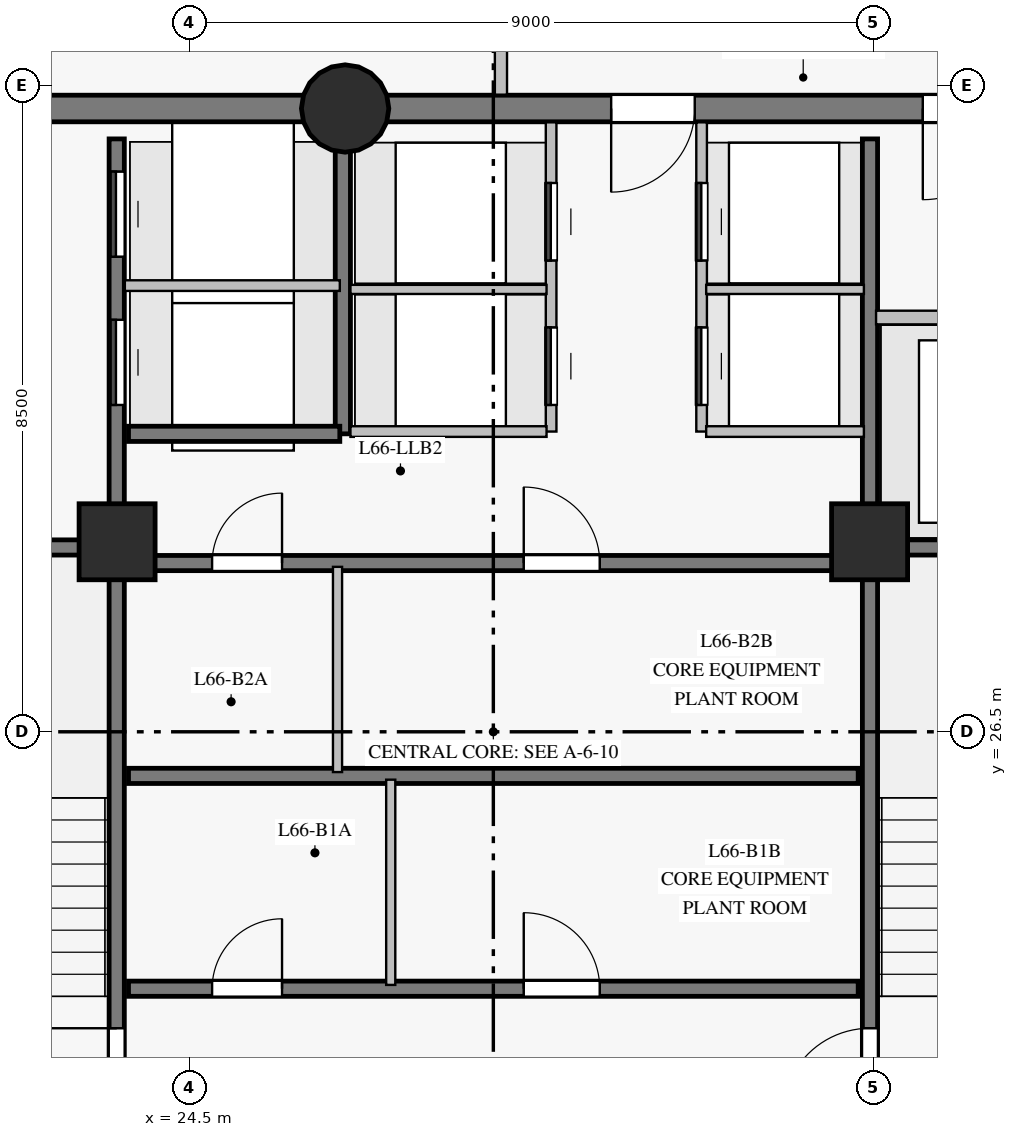
"""IFC4 building model, lengths in metres.
Left out: names, types, materials, properties, quantities, classifications, styles, units other than length and angle.
Written with IfcOpenShell. Run it as: python <this file> out.ifc"""

import sys

from ifc_helpers import new_model, si_unit, direction, frame, frame_2d, origin, origin_with_axes, origin_2d, place, context, subcontext, project, spatial, rectangle, circle, extrude, source, transform, mapped, element, fill, save


model = new_model("IFC4")
c1 = context("Model", 3, precision=1e-05, world=origin(), true_north=direction((0.0, 1.0)))
c2 = subcontext(c1, "Body", "Model", "MODEL_VIEW")
j1 = project(units=[si_unit("LENGTHUNIT", "METRE"), si_unit("PLANEANGLEUNIT", "RADIAN")], contexts=[c1])
p1 = place(None, origin())
s1 = spatial("IfcSite", under=j1, at=p1, CompositionType="ELEMENT")
p2 = place(p1, origin())
s2 = spatial("IfcBuilding", under=s1, at=p2, CompositionType="ELEMENT")
p3 = place(p2, frame((0.0, 0.0, 226.05)))
s3 = spatial("IfcBuildingStorey", under=s2, at=p3, CompositionType="ELEMENT", Elevation=226.05)
p4 = place(p3, frame((37.5, 34.7, 0.0), z_axis=(0.0, 0.0, 1.0), x_axis=(-1.0, 0.0, 0.0)))
e1 = element("IfcWall", 1, at=p4, inside=s3, PredefinedType="SHEAR", context=c2, shape_type="SweptSolid", body=[
    extrude(rectangle(XDim=10.95, YDim=0.35, at=frame_2d((5.475, 0.0))), origin(), (0.0, 0.0, 1.0), 2.85),
])
p5 = place(p4, frame((2.15, 0.0, 0.0)))
e2 = element("IfcOpeningElement", 2, at=p5, cuts=e1, PredefinedType="OPENING", context=c2, shape_type="SweptSolid", body=[
    extrude(rectangle(XDim=1.2, YDim=2.15, at=frame_2d((0.6, 1.075))), frame((0.0, 0.185, 0.0), z_axis=(0.0, -1.0, 0.0), x_axis=(1.0, 0.0, 0.0)), (0.0, 0.0, 1.0), 0.37),
])
p6 = place(p4, frame((6.35, 0.0, 0.0)))
e3 = element("IfcOpeningElement", 3, at=p6, cuts=e1, PredefinedType="OPENING", context=c2, shape_type="SweptSolid", body=[
    extrude(rectangle(XDim=1.1, YDim=2.15, at=frame_2d((0.55, 1.075))), frame((0.0, 0.185, 0.0), z_axis=(0.0, -1.0, 0.0), x_axis=(1.0, 0.0, 0.0)), (0.0, 0.0, 1.0), 0.37),
])
p7 = place(p3, frame((26.55, 34.7, 0.0), z_axis=(0.0, 0.0, 1.0), x_axis=(-1.0, 0.0, 0.0)))
e4 = element("IfcWall", 4, at=p7, inside=s3, PredefinedType="SHEAR", context=c2, shape_type="SweptSolid", body=[
    extrude(rectangle(XDim=7.05, YDim=0.35, at=frame_2d((3.525, 0.0))), origin(), (0.0, 0.0, 1.0), 2.85),
])
m1 = source(origin_with_axes(), c2, "Body", "SweptSolid", [
    extrude(circle(Radius=0.575, at=origin_2d()), origin(), (0.0, 0.0, 1.0), 3.05),
])
p8 = place(p3, frame((26.55, 34.7, 0.0), z_axis=(0.0, 0.0, 1.0), x_axis=(1.0, 0.0, 0.0)))
e5 = element("IfcColumn", 5, at=p8, inside=s3, PredefinedType="COLUMN", context=c2, shape_type="MappedRepresentation", body=[
    mapped(m1, transform((0.0, 0.0, 0.0), scale=1.0)),
])
m2 = source(origin_with_axes(), c2, "Body", "SweptSolid", [
    extrude(rectangle(XDim=1.0, YDim=1.0, at=origin_2d()), origin(), (0.0, 0.0, 1.0), 3.05),
])
for number, where, z_axis, x_axis in (
    (6, (23.55, 29.0, 0.0), (0.0, 0.0, 1.0), (1.0, 0.0, 0.0)),
    (7, (33.45, 29.0, 0.0), (0.0, 0.0, 1.0), (1.0, 0.0, 0.0)),
):
    element("IfcColumn", number, at=place(p3, frame(where, z_axis=z_axis, x_axis=x_axis)), inside=s3, PredefinedType="COLUMN", context=c2, shape_type="MappedRepresentation", body=[
        mapped(m2, transform((0.0, 0.0, 0.0), scale=1.0)),
    ])
p9 = place(p3, frame((23.545, 18.7, 0.0), z_axis=(0.0, 0.0, 1.0), x_axis=(0.0, 1.0, 0.0)))
e8 = element("IfcWall", 8, at=p9, inside=s3, PredefinedType="SHEAR", context=c2, shape_type="SweptSolid", body=[
    extrude(rectangle(XDim=15.6, YDim=0.2, at=frame_2d((7.8, 0.0))), origin(), (0.0, 0.0, 1.0), 2.85),
])
p10 = place(p9, frame((2.75, 0.0, 0.0)))
e9 = element("IfcOpeningElement", 9, at=p10, cuts=e8, PredefinedType="OPENING", context=c2, shape_type="SweptSolid", body=[
    extrude(rectangle(XDim=1.15, YDim=2.15, at=frame_2d((0.575, 1.075))), frame((0.0, 0.11, 0.0), z_axis=(0.0, -1.0, 0.0), x_axis=(1.0, 0.0, 0.0)), (0.0, 0.0, 1.0), 0.22),
])
p11 = place(p9, frame((0.14, 0.0, 0.0)))
e10 = element("IfcOpeningElement", 10, at=p11, cuts=e8, PredefinedType="OPENING", context=c2, shape_type="SweptSolid", body=[
    extrude(rectangle(XDim=0.88, YDim=2.1, at=frame_2d((0.44, 1.05))), frame((0.0, 0.11, 0.0), z_axis=(0.0, -1.0, 0.0), x_axis=(1.0, 0.0, 0.0)), (0.0, 0.0, 1.0), 0.22),
])
p12 = place(p9, frame((1.36, 0.0, 0.0)))
e11 = element("IfcOpeningElement", 11, at=p12, cuts=e8, PredefinedType="OPENING", context=c2, shape_type="SweptSolid", body=[
    extrude(rectangle(XDim=0.88, YDim=2.1, at=frame_2d((0.44, 1.05))), frame((0.0, 0.11, 0.0), z_axis=(0.0, -1.0, 0.0), x_axis=(1.0, 0.0, 0.0)), (0.0, 0.0, 1.0), 0.22),
])
p13 = place(p9, frame((12.1, 0.0, 0.0)))
e12 = element("IfcOpeningElement", 12, at=p13, cuts=e8, PredefinedType="OPENING", context=c2, shape_type="SweptSolid", body=[
    extrude(rectangle(XDim=1.12, YDim=2.15, at=frame_2d((0.56, 1.075))), frame((0.0, 0.11, 0.0), z_axis=(0.0, -1.0, 0.0), x_axis=(1.0, 0.0, 0.0)), (0.0, 0.0, 1.0), 0.22),
])
p14 = place(p9, frame((14.05, 0.0, 0.0)))
e13 = element("IfcOpeningElement", 13, at=p14, cuts=e8, PredefinedType="OPENING", context=c2, shape_type="SweptSolid", body=[
    extrude(rectangle(XDim=1.12, YDim=2.15, at=frame_2d((0.56, 1.075))), frame((0.0, 0.11, 0.0), z_axis=(0.0, -1.0, 0.0), x_axis=(1.0, 0.0, 0.0)), (0.0, 0.0, 1.0), 0.22),
])
p15 = place(p3, frame((33.455, 18.7, 0.0), z_axis=(0.0, 0.0, 1.0), x_axis=(0.0, 1.0, 0.0)))
e14 = element("IfcWall", 14, at=p15, inside=s3, PredefinedType="SHEAR", context=c2, shape_type="SweptSolid", body=[
    extrude(rectangle(XDim=15.6, YDim=0.2, at=frame_2d((7.8, 0.0))), origin(), (0.0, 0.0, 1.0), 2.85),
])
p16 = place(p15, frame((2.75, 0.0, 0.0)))
e15 = element("IfcOpeningElement", 15, at=p16, cuts=e14, PredefinedType="OPENING", context=c2, shape_type="SweptSolid", body=[
    extrude(rectangle(XDim=1.15, YDim=2.15, at=frame_2d((0.575, 1.075))), frame((0.0, 0.11, 0.0), z_axis=(0.0, -1.0, 0.0), x_axis=(1.0, 0.0, 0.0)), (0.0, 0.0, 1.0), 0.22),
])
p17 = place(p15, frame((0.55, 0.0, 0.0)))
e16 = element("IfcOpeningElement", 16, at=p17, cuts=e14, PredefinedType="OPENING", context=c2, shape_type="SweptSolid", body=[
    extrude(rectangle(XDim=0.94, YDim=2.1, at=frame_2d((0.47, 1.05))), frame((0.0, 0.11, 0.0), z_axis=(0.0, -1.0, 0.0), x_axis=(1.0, 0.0, 0.0)), (0.0, 0.0, 1.0), 0.22),
])
p18 = place(p3, frame((23.7, 23.12, 0.0), z_axis=(0.0, 0.0, 1.0), x_axis=(1.0, 0.0, 0.0)))
e17 = element("IfcWall", 17, at=p18, inside=s3, PredefinedType="SHEAR", context=c2, shape_type="SweptSolid", body=[
    extrude(rectangle(XDim=9.6, YDim=0.2, at=frame_2d((4.8, 0.0))), origin(), (0.0, 0.0, 1.0), 2.85),
])
p19 = place(p18, frame((1.1, 0.0, 0.0)))
e18 = element("IfcOpeningElement", 18, at=p19, cuts=e17, PredefinedType="OPENING", context=c2, shape_type="SweptSolid", body=[
    extrude(rectangle(XDim=0.92, YDim=2.1, at=frame_2d((0.46, 1.05))), frame((0.0, 0.11, 0.0), z_axis=(0.0, -1.0, 0.0), x_axis=(1.0, 0.0, 0.0)), (0.0, 0.0, 1.0), 0.22),
])
p20 = place(p18, frame((5.2, 0.0, 0.0)))
e19 = element("IfcOpeningElement", 19, at=p20, cuts=e17, PredefinedType="OPENING", context=c2, shape_type="SweptSolid", body=[
    extrude(rectangle(XDim=1.0, YDim=2.15, at=frame_2d((0.5, 1.075))), frame((0.0, 0.11, 0.0), z_axis=(0.0, -1.0, 0.0), x_axis=(1.0, 0.0, 0.0)), (0.0, 0.0, 1.0), 0.22),
])
p21 = place(p3, frame((23.7, 25.92, 0.0), z_axis=(0.0, 0.0, 1.0), x_axis=(1.0, 0.0, 0.0)))
e20 = element("IfcWall", 20, at=p21, inside=s3, PredefinedType="SHEAR", context=c2, shape_type="SweptSolid", body=[
    extrude(rectangle(XDim=9.6, YDim=0.2, at=frame_2d((4.8, 0.0))), origin(), (0.0, 0.0, 1.0), 2.85),
])
p22 = place(p3, frame((23.7, 28.72, 0.0), z_axis=(0.0, 0.0, 1.0), x_axis=(1.0, 0.0, 0.0)))
e21 = element("IfcWall", 21, at=p22, inside=s3, PredefinedType="SHEAR", context=c2, shape_type="SweptSolid", body=[
    extrude(rectangle(XDim=9.6, YDim=0.2, at=frame_2d((4.8, 0.0))), origin(), (0.0, 0.0, 1.0), 2.85),
])
p23 = place(p22, frame((1.1, 0.0, 0.0)))
e22 = element("IfcOpeningElement", 22, at=p23, cuts=e21, PredefinedType="OPENING", context=c2, shape_type="SweptSolid", body=[
    extrude(rectangle(XDim=0.92, YDim=2.1, at=frame_2d((0.46, 1.05))), frame((0.0, 0.11, 0.0), z_axis=(0.0, -1.0, 0.0), x_axis=(1.0, 0.0, 0.0)), (0.0, 0.0, 1.0), 0.22),
])
p24 = place(p22, frame((5.2, 0.0, 0.0)))
e23 = element("IfcOpeningElement", 23, at=p24, cuts=e21, PredefinedType="OPENING", context=c2, shape_type="SweptSolid", body=[
    extrude(rectangle(XDim=1.0, YDim=2.15, at=frame_2d((0.5, 1.075))), frame((0.0, 0.11, 0.0), z_axis=(0.0, -1.0, 0.0), x_axis=(1.0, 0.0, 0.0)), (0.0, 0.0, 1.0), 0.22),
])
for number, where, z_axis, x_axis in (
    (24, (33.455, 28.925, 0.0), (0.0, 0.0, 1.0), (1.0, 0.0, 0.0)),
    (25, (19.55, 28.925, 0.0), (0.0, 0.0, 1.0), (1.0, 0.0, 0.0)),
):
    element("IfcWall", number, at=place(p3, frame(where, z_axis=z_axis, x_axis=x_axis)), inside=s3, PredefinedType="SHEAR", context=c2, shape_type="SweptSolid", body=[
        extrude(rectangle(XDim=3.995, YDim=0.2, at=frame_2d((1.998, 0.0))), origin(), (0.0, 0.0, 1.0), 2.85),
    ])
p25 = place(p3, frame((26.52, 30.42, 0.0), z_axis=(0.0, 0.0, 1.0), x_axis=(0.0, 1.0, 0.0)))
e26 = element("IfcWall", 26, at=p25, inside=s3, PredefinedType="SHEAR", context=c2, shape_type="SweptSolid", body=[
    extrude(rectangle(XDim=3.86, YDim=0.2, at=frame_2d((1.93, 0.0))), origin(), (0.0, 0.0, 1.0), 2.85),
])
p26 = place(p3, frame((23.7, 30.42, 0.0), z_axis=(0.0, 0.0, 1.0), x_axis=(1.0, 0.0, 0.0)))
e27 = element("IfcWall", 27, at=p26, inside=s3, PredefinedType="SHEAR", context=c2, shape_type="SweptSolid", body=[
    extrude(rectangle(XDim=2.78, YDim=0.2, at=frame_2d((1.39, 0.0))), origin(), (0.0, 0.0, 1.0), 2.85),
])
p27 = place(p3, frame((29.26, 30.45, 0.0), z_axis=(0.0, 0.0, 1.0), x_axis=(0.0, 1.0, 0.0)))
e28 = element("IfcWall", 28, at=p27, inside=s3, PredefinedType="PARTITIONING", context=c2, shape_type="SweptSolid", body=[
    extrude(rectangle(XDim=4.068, YDim=0.14, at=frame_2d((2.034, 0.0))), origin(), (0.0, 0.0, 1.0), 2.85),
])
p28 = place(p27, frame((0.35, 0.0, 0.0)))
e29 = element("IfcOpeningElement", 29, at=p28, cuts=e28, PredefinedType="OPENING", context=c2, shape_type="SweptSolid", body=[
    extrude(rectangle(XDim=1.02, YDim=2.15, at=frame_2d((0.51, 1.075))), frame((0.0, 0.08, 0.0), z_axis=(0.0, -1.0, 0.0), x_axis=(1.0, 0.0, 0.0)), (0.0, 0.0, 1.0), 0.16),
])
p29 = place(p27, frame((2.25, 0.0, 0.0)))
e30 = element("IfcOpeningElement", 30, at=p29, cuts=e28, PredefinedType="OPENING", context=c2, shape_type="SweptSolid", body=[
    extrude(rectangle(XDim=1.02, YDim=2.15, at=frame_2d((0.51, 1.075))), frame((0.0, 0.08, 0.0), z_axis=(0.0, -1.0, 0.0), x_axis=(1.0, 0.0, 0.0)), (0.0, 0.0, 1.0), 0.16),
])
p30 = place(p3, frame((31.24, 30.45, 0.0), z_axis=(0.0, 0.0, 1.0), x_axis=(0.0, 1.0, 0.0)))
e31 = element("IfcWall", 31, at=p30, inside=s3, PredefinedType="PARTITIONING", context=c2, shape_type="SweptSolid", body=[
    extrude(rectangle(XDim=4.068, YDim=0.14, at=frame_2d((2.034, 0.0))), origin(), (0.0, 0.0, 1.0), 2.85),
])
p31 = place(p30, frame((0.35, 0.0, 0.0)))
e32 = element("IfcOpeningElement", 32, at=p31, cuts=e31, PredefinedType="OPENING", context=c2, shape_type="SweptSolid", body=[
    extrude(rectangle(XDim=1.02, YDim=2.15, at=frame_2d((0.51, 1.075))), frame((0.0, 0.08, 0.0), z_axis=(0.0, -1.0, 0.0), x_axis=(1.0, 0.0, 0.0)), (0.0, 0.0, 1.0), 0.16),
])
p32 = place(p30, frame((2.25, 0.0, 0.0)))
e33 = element("IfcOpeningElement", 33, at=p32, cuts=e31, PredefinedType="OPENING", context=c2, shape_type="SweptSolid", body=[
    extrude(rectangle(XDim=1.02, YDim=2.15, at=frame_2d((0.51, 1.075))), frame((0.0, 0.08, 0.0), z_axis=(0.0, -1.0, 0.0), x_axis=(1.0, 0.0, 0.0)), (0.0, 0.0, 1.0), 0.16),
])
p33 = place(p3, frame((33.535, 31.95, 0.0), z_axis=(0.0, 0.0, 1.0), x_axis=(1.0, 0.0, 0.0)))
e34 = element("IfcWall", 34, at=p33, inside=s3, PredefinedType="PARTITIONING", context=c2, shape_type="SweptSolid", body=[
    extrude(rectangle(XDim=3.784, YDim=0.18, at=frame_2d((1.892, 0.0))), origin(), (0.0, 0.0, 1.0), 2.85),
])
p34 = place(p33, frame((0.9, 0.0, 0.0)))
e35 = element("IfcOpeningElement", 35, at=p34, cuts=e34, PredefinedType="OPENING", context=c2, shape_type="SweptSolid", body=[
    extrude(rectangle(XDim=1.3, YDim=2.2, at=frame_2d((0.65, 1.1))), frame((0.0, 0.1, 0.0), z_axis=(0.0, -1.0, 0.0), x_axis=(1.0, 0.0, 0.0)), (0.0, 0.0, 1.0), 0.2),
])
p35 = place(p3, frame((23.652, 32.37, 0.0), z_axis=(0.0, 0.0, 1.0), x_axis=(1.0, 0.0, 0.0)))
e36 = element("IfcWall", 36, at=p35, inside=s3, PredefinedType="PARTITIONING", context=c2, shape_type="SweptSolid", body=[
    extrude(rectangle(XDim=2.828, YDim=0.14, at=frame_2d((1.414, 0.0))), origin(), (0.0, 0.0, 1.0), 2.85),
])
p36 = place(p3, frame((27.15, 23.17, 0.0), z_axis=(0.0, 0.0, 1.0), x_axis=(0.0, 1.0, 0.0)))
e37 = element("IfcWall", 37, at=p36, inside=s3, PredefinedType="PARTITIONING", context=c2, shape_type="SweptSolid", body=[
    extrude(rectangle(XDim=2.7, YDim=0.12, at=frame_2d((1.35, 0.0))), origin(), (0.0, 0.0, 1.0), 2.85),
])
p37 = place(p3, frame((26.45, 25.97, 0.0), z_axis=(0.0, 0.0, 1.0), x_axis=(0.0, 1.0, 0.0)))
e38 = element("IfcWall", 38, at=p37, inside=s3, PredefinedType="PARTITIONING", context=c2, shape_type="SweptSolid", body=[
    extrude(rectangle(XDim=2.7, YDim=0.12, at=frame_2d((1.35, 0.0))), origin(), (0.0, 0.0, 1.0), 2.85),
])
p38 = place(p3, frame((26.62, 30.45, 0.0), z_axis=(0.0, 0.0, 1.0), x_axis=(1.0, 0.0, 0.0)))
e39 = element("IfcWall", 39, at=p38, inside=s3, PredefinedType="PARTITIONING", context=c2, shape_type="SweptSolid", body=[
    extrude(rectangle(XDim=2.58, YDim=0.14, at=frame_2d((1.29, 0.0))), origin(), (0.0, 0.0, 1.0), 2.85),
])
p39 = place(p3, frame((26.62, 32.32, 0.0), z_axis=(0.0, 0.0, 1.0), x_axis=(1.0, 0.0, 0.0)))
e40 = element("IfcWall", 40, at=p39, inside=s3, PredefinedType="PARTITIONING", context=c2, shape_type="SweptSolid", body=[
    extrude(rectangle(XDim=2.58, YDim=0.12, at=frame_2d((1.29, 0.0))), origin(), (0.0, 0.0, 1.0), 2.85),
])
p40 = place(p3, frame((31.3, 30.45, 0.0), z_axis=(0.0, 0.0, 1.0), x_axis=(1.0, 0.0, 0.0)))
e41 = element("IfcWall", 41, at=p40, inside=s3, PredefinedType="PARTITIONING", context=c2, shape_type="SweptSolid", body=[
    extrude(rectangle(XDim=2.075, YDim=0.14, at=frame_2d((1.038, 0.0))), origin(), (0.0, 0.0, 1.0), 2.85),
])
p41 = place(p3, frame((31.3, 32.32, 0.0), z_axis=(0.0, 0.0, 1.0), x_axis=(1.0, 0.0, 0.0)))
e42 = element("IfcWall", 42, at=p41, inside=s3, PredefinedType="PARTITIONING", context=c2, shape_type="SweptSolid", body=[
    extrude(rectangle(XDim=2.075, YDim=0.12, at=frame_2d((1.038, 0.0))), origin(), (0.0, 0.0, 1.0), 2.85),
])
p42 = place(p3, frame((28.6, 34.882, 0.0), z_axis=(0.0, 0.0, 1.0), x_axis=(0.0, 1.0, 0.0)))
e43 = element("IfcWall", 43, at=p42, inside=s3, PredefinedType="PARTITIONING", context=c2, shape_type="SweptSolid", body=[
    extrude(rectangle(XDim=1.518, YDim=0.16, at=frame_2d((0.759, 0.0))), origin(), (0.0, 0.0, 1.0), 2.85),
])
m3 = source(origin_with_axes(), c2, "Body", "SweptSolid", [
    extrude(rectangle(XDim=1.15, YDim=2.15, at=frame_2d((0.575, 1.075))), frame((0.0, 0.025, 0.0), z_axis=(0.0, -1.0, 0.0), x_axis=(1.0, 0.0, 0.0)), (0.0, 0.0, 1.0), 0.05),
])
p43 = place(p10, origin())
e44 = element("IfcDoor", 44, at=p43, inside=s3, OperationType="SINGLE_SWING_RIGHT", PredefinedType="DOOR", context=c2, shape_type="MappedRepresentation", body=[
    mapped(m3, transform((0.0, 0.0, 0.0), scale=1.0)),
])
fill(e9, e44)
p44 = place(p16, origin())
e45 = element("IfcDoor", 45, at=p44, inside=s3, OperationType="SINGLE_SWING_LEFT", PredefinedType="DOOR", context=c2, shape_type="MappedRepresentation", body=[
    mapped(m3, transform((0.0, 0.0, 0.0), scale=1.0)),
])
fill(e15, e45)
m4 = source(origin_with_axes(), c2, "Body", "SweptSolid", [
    extrude(rectangle(XDim=1.2, YDim=2.15, at=frame_2d((0.6, 1.075))), frame((0.0, 0.025, 0.0), z_axis=(0.0, -1.0, 0.0), x_axis=(1.0, 0.0, 0.0)), (0.0, 0.0, 1.0), 0.05),
])
p45 = place(p5, origin())
e46 = element("IfcDoor", 46, at=p45, inside=s3, OperationType="SINGLE_SWING_RIGHT", PredefinedType="DOOR", context=c2, shape_type="MappedRepresentation", body=[
    mapped(m4, transform((0.0, 0.0, 0.0), scale=1.0)),
])
fill(e2, e46)
m5 = source(origin_with_axes(), c2, "Body", "SweptSolid", [
    extrude(rectangle(XDim=0.92, YDim=2.1, at=frame_2d((0.46, 1.05))), frame((0.0, 0.025, 0.0), z_axis=(0.0, -1.0, 0.0), x_axis=(1.0, 0.0, 0.0)), (0.0, 0.0, 1.0), 0.05),
])
p46 = place(p19, origin())
e47 = element("IfcDoor", 47, at=p46, inside=s3, OperationType="SINGLE_SWING_RIGHT", PredefinedType="DOOR", context=c2, shape_type="MappedRepresentation", body=[
    mapped(m5, transform((0.0, 0.0, 0.0), scale=1.0)),
])
fill(e18, e47)
m6 = source(origin_with_axes(), c2, "Body", "SweptSolid", [
    extrude(rectangle(XDim=1.0, YDim=2.15, at=frame_2d((0.5, 1.075))), frame((0.0, 0.025, 0.0), z_axis=(0.0, -1.0, 0.0), x_axis=(1.0, 0.0, 0.0)), (0.0, 0.0, 1.0), 0.05),
])
p47 = place(p20, origin())
e48 = element("IfcDoor", 48, at=p47, inside=s3, OperationType="SINGLE_SWING_LEFT", PredefinedType="DOOR", context=c2, shape_type="MappedRepresentation", body=[
    mapped(m6, transform((0.0, 0.0, 0.0), scale=1.0)),
])
fill(e19, e48)
p48 = place(p23, origin())
e49 = element("IfcDoor", 49, at=p48, inside=s3, OperationType="SINGLE_SWING_RIGHT", PredefinedType="DOOR", context=c2, shape_type="MappedRepresentation", body=[
    mapped(m5, transform((0.0, 0.0, 0.0), scale=1.0)),
])
fill(e22, e49)
p49 = place(p24, origin())
e50 = element("IfcDoor", 50, at=p49, inside=s3, OperationType="SINGLE_SWING_LEFT", PredefinedType="DOOR", context=c2, shape_type="MappedRepresentation", body=[
    mapped(m6, transform((0.0, 0.0, 0.0), scale=1.0)),
])
fill(e23, e50)
m7 = source(origin_with_axes(), c2, "Body", "SweptSolid", [
    extrude(rectangle(XDim=1.1, YDim=2.15, at=frame_2d((0.55, 1.075))), frame((0.0, 0.025, 0.0), z_axis=(0.0, -1.0, 0.0), x_axis=(1.0, 0.0, 0.0)), (0.0, 0.0, 1.0), 0.05),
])
p50 = place(p6, origin())
e51 = element("IfcDoor", 51, at=p50, inside=s3, OperationType="SINGLE_SWING_RIGHT", PredefinedType="DOOR", context=c2, shape_type="MappedRepresentation", body=[
    mapped(m7, transform((0.0, 0.0, 0.0), scale=1.0)),
])
fill(e3, e51)
m8 = source(origin_with_axes(), c2, "Body", "SweptSolid", [
    extrude(rectangle(XDim=1.12, YDim=2.15, at=frame_2d((0.56, 1.075))), frame((0.0, 0.025, 0.0), z_axis=(0.0, -1.0, 0.0), x_axis=(1.0, 0.0, 0.0)), (0.0, 0.0, 1.0), 0.05),
])
p51 = place(p13, origin())
e52 = element("IfcDoor", 52, at=p51, inside=s3, OperationType="SLIDING_TO_LEFT", PredefinedType="DOOR", context=c2, shape_type="MappedRepresentation", body=[
    mapped(m8, transform((0.0, 0.0, 0.0), scale=1.0)),
])
fill(e12, e52)
p52 = place(p14, origin())
e53 = element("IfcDoor", 53, at=p52, inside=s3, OperationType="SLIDING_TO_RIGHT", PredefinedType="DOOR", context=c2, shape_type="MappedRepresentation", body=[
    mapped(m8, transform((0.0, 0.0, 0.0), scale=1.0)),
])
fill(e13, e53)
m9 = source(origin_with_axes(), c2, "Body", "SweptSolid", [
    extrude(rectangle(XDim=1.02, YDim=2.15, at=frame_2d((0.51, 1.075))), frame((0.0, 0.025, 0.0), z_axis=(0.0, -1.0, 0.0), x_axis=(1.0, 0.0, 0.0)), (0.0, 0.0, 1.0), 0.05),
])
p53 = place(p28, origin())
e54 = element("IfcDoor", 54, at=p53, inside=s3, OperationType="SLIDING_TO_LEFT", PredefinedType="DOOR", context=c2, shape_type="MappedRepresentation", body=[
    mapped(m9, transform((0.0, 0.0, 0.0), scale=1.0)),
])
fill(e29, e54)
p54 = place(p29, origin())
e55 = element("IfcDoor", 55, at=p54, inside=s3, OperationType="SLIDING_TO_LEFT", PredefinedType="DOOR", context=c2, shape_type="MappedRepresentation", body=[
    mapped(m9, transform((0.0, 0.0, 0.0), scale=1.0)),
])
fill(e30, e55)
p55 = place(p31, origin())
e56 = element("IfcDoor", 56, at=p55, inside=s3, OperationType="SLIDING_TO_LEFT", PredefinedType="DOOR", context=c2, shape_type="MappedRepresentation", body=[
    mapped(m9, transform((0.0, 0.0, 0.0), scale=1.0)),
])
fill(e32, e56)
p56 = place(p32, origin())
e57 = element("IfcDoor", 57, at=p56, inside=s3, OperationType="SLIDING_TO_LEFT", PredefinedType="DOOR", context=c2, shape_type="MappedRepresentation", body=[
    mapped(m9, transform((0.0, 0.0, 0.0), scale=1.0)),
])
fill(e33, e57)
save(model, sys.argv[1])
